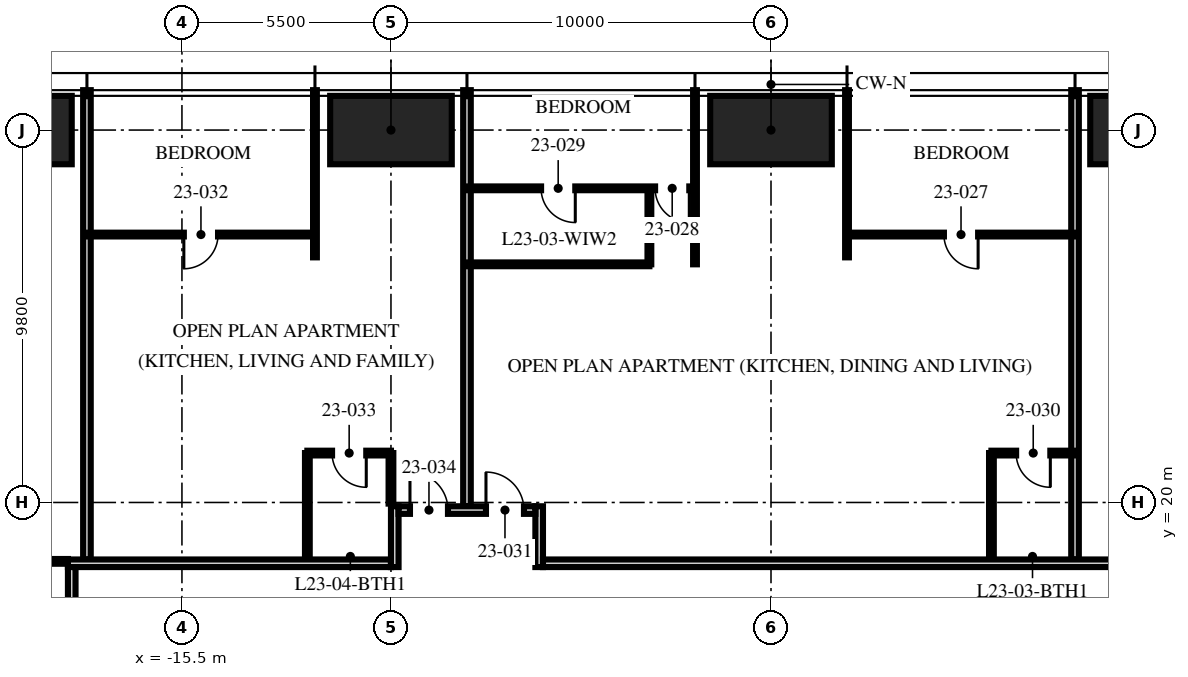
"""IFC4 building model, lengths in metres.
Left out: names, types, materials, properties, quantities, classifications, styles, units other than length and angle.
Written with IfcOpenShell. Run it as: python <this file> out.ifc"""

import sys

from ifc_helpers import new_model, si_unit, direction, frame, frame_2d, origin, origin_2d, place, context, subcontext, project, spatial, rectangle, hollow_rectangle, extrude, element, fill, save


model = new_model("IFC4")
c1 = context("Model", 3, precision=1e-05, world=origin(), true_north=direction((0.0, 1.0)))
c2 = subcontext(c1, "Body", "Model", "MODEL_VIEW")
j1 = project(units=[si_unit("LENGTHUNIT", "METRE"), si_unit("PLANEANGLEUNIT", "RADIAN")], contexts=[c1])
p1 = place(None, origin())
s1 = spatial("IfcSite", under=j1, at=p1, CompositionType="ELEMENT")
p2 = place(p1, origin())
s2 = spatial("IfcBuilding", under=s1, at=p2, CompositionType="ELEMENT")
p3 = place(p2, frame((0.0, 0.0, 92.25)))
s3 = spatial("IfcBuildingStorey", under=s2, at=p3, CompositionType="ELEMENT", Elevation=92.25)
for number, where, z_axis, x_axis in (
    (1, (-20.0, 29.8, 0.0), (0.0, 0.0, 1.0), (1.0, 0.0, 0.0)),
    (2, (-10.0, 29.8, 0.0), (0.0, 0.0, 1.0), (1.0, 0.0, 0.0)),
    (3, (0.0, 29.8, 0.0), (0.0, 0.0, 1.0), (1.0, 0.0, 0.0)),
    (4, (10.0, 29.8, 0.0), (0.0, 0.0, 1.0), (1.0, 0.0, 0.0)),
):
    element("IfcColumn", number, at=place(p3, frame(where, z_axis=z_axis, x_axis=x_axis)), inside=s3, PredefinedType="COLUMN", context=c2, shape_type="SweptSolid", body=[
        extrude(hollow_rectangle(XDim=3.2, YDim=1.8, WallThickness=0.2, at=origin_2d()), origin(), (0.0, 0.0, 1.0), 3.75),
    ])
p4 = place(p3, frame((8.0, 18.5, 0.0), z_axis=(0.0, 0.0, 1.0), x_axis=(0.0, 1.0, 0.0)))
e5 = element("IfcWall", 5, at=p4, inside=s3, PredefinedType="PARTITIONING", context=c2, shape_type="SweptSolid", body=[
    extrude(rectangle(XDim=12.35, YDim=0.2, at=frame_2d((6.175, 0.0))), origin(), (0.0, 0.0, 1.0), 2.61),
])
p5 = place(p3, frame((2.0, 26.45, 0.0), z_axis=(0.0, 0.0, 1.0), x_axis=(0.0, 1.0, 0.0)))
e6 = element("IfcWall", 6, at=p5, inside=s3, PredefinedType="PARTITIONING", context=c2, shape_type="SweptSolid", body=[
    extrude(rectangle(XDim=4.4, YDim=0.1, at=frame_2d((2.2, 0.0))), origin(), (0.0, 0.0, 1.0), 2.61),
])
p6 = place(p3, frame((-2.0, 26.267, 0.0), z_axis=(0.0, 0.0, 1.0), x_axis=(0.0, 1.0, 0.0)))
e7 = element("IfcWall", 7, at=p6, inside=s3, PredefinedType="PARTITIONING", context=c2, shape_type="SweptSolid", body=[
    extrude(rectangle(XDim=4.583, YDim=0.1, at=frame_2d((2.292, 0.0))), origin(), (0.0, 0.0, 1.0), 2.61),
])
p7 = place(p3, frame((-8.0, 19.9, 0.0), z_axis=(0.0, 0.0, 1.0), x_axis=(0.0, 1.0, 0.0)))
e8 = element("IfcWall", 8, at=p7, inside=s3, PredefinedType="PARTITIONING", context=c2, shape_type="SweptSolid", body=[
    extrude(rectangle(XDim=10.95, YDim=0.2, at=frame_2d((5.475, 0.0))), origin(), (0.0, 0.0, 1.0), 2.61),
])
p8 = place(p3, frame((-12.0, 26.45, 0.0), z_axis=(0.0, 0.0, 1.0), x_axis=(0.0, 1.0, 0.0)))
e9 = element("IfcWall", 9, at=p8, inside=s3, PredefinedType="PARTITIONING", context=c2, shape_type="SweptSolid", body=[
    extrude(rectangle(XDim=4.4, YDim=0.1, at=frame_2d((2.2, 0.0))), origin(), (0.0, 0.0, 1.0), 2.61),
])
p9 = place(p3, frame((-18.0, 18.5, 0.0), z_axis=(0.0, 0.0, 1.0), x_axis=(0.0, 1.0, 0.0)))
e10 = element("IfcWall", 10, at=p9, inside=s3, PredefinedType="PARTITIONING", context=c2, shape_type="SweptSolid", body=[
    extrude(rectangle(XDim=12.35, YDim=0.2, at=frame_2d((6.175, 0.0))), origin(), (0.0, 0.0, 1.0), 2.3),
])
p10 = place(p3, frame((8.0, 27.05, 0.0), z_axis=(0.0, 0.0, 1.0), x_axis=(-1.0, 0.0, 0.0)))
e11 = element("IfcWall", 11, at=p10, inside=s3, PredefinedType="PARTITIONING", context=c2, shape_type="SweptSolid", body=[
    extrude(rectangle(XDim=6.0, YDim=0.1, at=frame_2d((3.0, 0.0))), origin(), (0.0, 0.0, 1.0), 2.6),
])
p11 = place(p10, frame((2.55, 0.0, 0.0)))
e12 = element("IfcOpeningElement", 12, at=p11, cuts=e11, PredefinedType="OPENING", context=c2, shape_type="SweptSolid", body=[
    extrude(rectangle(XDim=0.9, YDim=2.1, at=frame_2d((0.45, 1.05))), frame((0.0, 0.06, 0.0), z_axis=(0.0, -1.0, 0.0), x_axis=(1.0, 0.0, 0.0)), (0.0, 0.0, 1.0), 0.12),
])
p12 = place(p3, frame((-2.0, 28.267, 0.0), z_axis=(0.0, 0.0, 1.0), x_axis=(-1.0, 0.0, 0.0)))
e13 = element("IfcWall", 13, at=p12, inside=s3, PredefinedType="PARTITIONING", context=c2, shape_type="SweptSolid", body=[
    extrude(rectangle(XDim=6.0, YDim=0.1, at=frame_2d((3.0, 0.0))), origin(), (0.0, 0.0, 1.0), 2.6),
])
p13 = place(p12, frame((0.15, 0.0, 0.0)))
e14 = element("IfcOpeningElement", 14, at=p13, cuts=e13, PredefinedType="OPENING", context=c2, shape_type="SweptSolid", body=[
    extrude(rectangle(XDim=0.9, YDim=2.1, at=frame_2d((0.45, 1.05))), frame((0.0, 0.06, 0.0), z_axis=(0.0, -1.0, 0.0), x_axis=(1.0, 0.0, 0.0)), (0.0, 0.0, 1.0), 0.12),
])
p14 = place(p12, frame((3.15, 0.0, 0.0)))
e15 = element("IfcOpeningElement", 15, at=p14, cuts=e13, PredefinedType="OPENING", context=c2, shape_type="SweptSolid", body=[
    extrude(rectangle(XDim=0.9, YDim=2.1, at=frame_2d((0.45, 1.05))), frame((0.0, 0.06, 0.0), z_axis=(0.0, -1.0, 0.0), x_axis=(1.0, 0.0, 0.0)), (0.0, 0.0, 1.0), 0.12),
])
p15 = place(p3, frame((-3.2, 26.267, 0.0), z_axis=(0.0, 0.0, 1.0), x_axis=(0.0, 1.0, 0.0)))
e16 = element("IfcWall", 16, at=p15, inside=s3, PredefinedType="PARTITIONING", context=c2, shape_type="SweptSolid", body=[
    extrude(rectangle(XDim=2.0, YDim=0.1, at=frame_2d((1.0, 0.0))), origin(), (0.0, 0.0, 1.0), 3.5),
])
p16 = place(p3, frame((-3.2, 26.267, 0.0), z_axis=(0.0, 0.0, 1.0), x_axis=(-1.0, 0.0, 0.0)))
e17 = element("IfcWall", 17, at=p16, inside=s3, PredefinedType="PARTITIONING", context=c2, shape_type="SweptSolid", body=[
    extrude(rectangle(XDim=4.8, YDim=0.1, at=frame_2d((2.4, 0.0))), origin(), (0.0, 0.0, 1.0), 2.6),
])
p17 = place(p3, frame((8.0, 21.3, 0.0), z_axis=(0.0, 0.0, 1.0), x_axis=(-1.0, 0.0, 0.0)))
e18 = element("IfcWall", 18, at=p17, inside=s3, PredefinedType="PARTITIONING", context=c2, shape_type="SweptSolid", body=[
    extrude(rectangle(XDim=2.2, YDim=0.125, at=frame_2d((1.1, 0.0))), origin(), (0.0, 0.0, 1.0), 3.5),
])
p18 = place(p17, frame((0.65, 0.0, 0.0)))
e19 = element("IfcOpeningElement", 19, at=p18, cuts=e18, PredefinedType="OPENING", context=c2, shape_type="SweptSolid", body=[
    extrude(rectangle(XDim=0.9, YDim=2.1, at=frame_2d((0.45, 1.05))), frame((0.0, 0.073, 0.0), z_axis=(0.0, -1.0, 0.0), x_axis=(1.0, 0.0, 0.0)), (0.0, 0.0, 1.0), 0.145),
])
p19 = place(p3, frame((5.8, 18.5, 0.0), z_axis=(0.0, 0.0, 1.0), x_axis=(0.0, 1.0, 0.0)))
e20 = element("IfcWall", 20, at=p19, inside=s3, PredefinedType="PARTITIONING", context=c2, shape_type="SweptSolid", body=[
    extrude(rectangle(XDim=2.8, YDim=0.125, at=frame_2d((1.4, 0.0))), origin(), (0.0, 0.0, 1.0), 3.5),
])
p20 = place(p3, frame((-12.0, 27.05, 0.0), z_axis=(0.0, 0.0, 1.0), x_axis=(-1.0, 0.0, 0.0)))
e21 = element("IfcWall", 21, at=p20, inside=s3, PredefinedType="PARTITIONING", context=c2, shape_type="SweptSolid", body=[
    extrude(rectangle(XDim=6.0, YDim=0.1, at=frame_2d((3.0, 0.0))), origin(), (0.0, 0.0, 1.0), 2.6),
])
p21 = place(p20, frame((2.55, 0.0, 0.0)))
e22 = element("IfcOpeningElement", 22, at=p21, cuts=e21, PredefinedType="OPENING", context=c2, shape_type="SweptSolid", body=[
    extrude(rectangle(XDim=0.9, YDim=2.1, at=frame_2d((0.45, 1.05))), frame((0.0, 0.06, 0.0), z_axis=(0.0, -1.0, 0.0), x_axis=(1.0, 0.0, 0.0)), (0.0, 0.0, 1.0), 0.12),
])
p22 = place(p3, frame((-10.0, 21.3, 0.0), z_axis=(0.0, 0.0, 1.0), x_axis=(-1.0, 0.0, 0.0)))
e23 = element("IfcWall", 23, at=p22, inside=s3, PredefinedType="PARTITIONING", context=c2, shape_type="SweptSolid", body=[
    extrude(rectangle(XDim=2.2, YDim=0.125, at=frame_2d((1.1, 0.0))), origin(), (0.0, 0.0, 1.0), 2.492),
])
p23 = place(p22, frame((0.65, 0.0, 0.0)))
e24 = element("IfcOpeningElement", 24, at=p23, cuts=e23, PredefinedType="OPENING", context=c2, shape_type="SweptSolid", body=[
    extrude(rectangle(XDim=0.9, YDim=2.1, at=frame_2d((0.45, 1.05))), frame((0.0, 0.073, 0.0), z_axis=(0.0, -1.0, 0.0), x_axis=(1.0, 0.0, 0.0)), (0.0, 0.0, 1.0), 0.145),
])
p24 = place(p3, frame((-10.0, 19.97, 0.0), z_axis=(0.0, 0.0, 1.0), x_axis=(0.0, 1.0, 0.0)))
e25 = element("IfcWall", 25, at=p24, inside=s3, PredefinedType="PARTITIONING", context=c2, shape_type="SweptSolid", body=[
    extrude(rectangle(XDim=1.33, YDim=0.125, at=frame_2d((0.665, 0.0))), origin(), (0.0, 0.0, 1.0), 2.492),
])
p25 = place(p3, frame((-12.2, 18.5, 0.0), z_axis=(0.0, 0.0, 1.0), x_axis=(0.0, 1.0, 0.0)))
e26 = element("IfcWall", 26, at=p25, inside=s3, PredefinedType="PARTITIONING", context=c2, shape_type="SweptSolid", body=[
    extrude(rectangle(XDim=2.8, YDim=0.125, at=frame_2d((1.4, 0.0))), origin(), (0.0, 0.0, 1.0), 3.5),
])
p26 = place(p3, frame((-18.5, 18.45, 0.0), z_axis=(0.0, 0.0, 1.0), x_axis=(-1.0, 0.0, 0.0)))
e27 = element("IfcWall", 27, at=p26, inside=s3, PredefinedType="PARTITIONING", context=c2, shape_type="SweptSolid", body=[
    extrude(rectangle(XDim=2.8, YDim=0.125, at=frame_2d((1.4, 0.0))), origin(), (0.0, 0.0, 1.0), 2.3),
])
p27 = place(p3, frame((-18.5, 18.4, 0.0), z_axis=(0.0, 0.0, 1.0), x_axis=(1.0, 0.0, 0.0)))
e28 = element("IfcWall", 28, at=p27, inside=s3, PredefinedType="PARTITIONING", context=c2, shape_type="SweptSolid", body=[
    extrude(rectangle(XDim=8.5, YDim=0.2, at=frame_2d((4.25, 0.0))), origin(), (0.0, 0.0, 1.0), 2.3),
])
p28 = place(p3, frame((-9.9, 18.3, 0.0), z_axis=(0.0, 0.0, 1.0), x_axis=(0.0, 1.0, 0.0)))
e29 = element("IfcWall", 29, at=p28, inside=s3, PredefinedType="PARTITIONING", context=c2, shape_type="SweptSolid", body=[
    extrude(rectangle(XDim=1.6, YDim=0.2, at=frame_2d((0.8, 0.0))), origin(), (0.0, 0.0, 1.0), 2.492),
])
p29 = place(p3, frame((-6.1, 18.3, 0.0), z_axis=(0.0, 0.0, 1.0), x_axis=(0.0, 1.0, 0.0)))
e30 = element("IfcWall", 30, at=p29, inside=s3, PredefinedType="PARTITIONING", context=c2, shape_type="SweptSolid", body=[
    extrude(rectangle(XDim=1.6, YDim=0.2, at=frame_2d((0.8, 0.0))), origin(), (0.0, 0.0, 1.0), 3.5),
])
p30 = place(p3, frame((-9.8, 19.8, 0.0), z_axis=(0.0, 0.0, 1.0), x_axis=(1.0, 0.0, 0.0)))
e31 = element("IfcWall", 31, at=p30, inside=s3, PredefinedType="PARTITIONING", context=c2, shape_type="SweptSolid", body=[
    extrude(rectangle(XDim=3.6, YDim=0.2, at=frame_2d((1.8, 0.0))), origin(), (0.0, 0.0, 1.0), 3.5),
])
p31 = place(p30, frame((2.3, 0.0, 0.0)))
e32 = element("IfcOpeningElement", 32, at=p31, cuts=e31, PredefinedType="OPENING", context=c2, shape_type="SweptSolid", body=[
    extrude(rectangle(XDim=1.0, YDim=2.2, at=frame_2d((0.5, 1.1))), frame((0.0, 0.11, 0.0), z_axis=(0.0, -1.0, 0.0), x_axis=(1.0, 0.0, 0.0)), (0.0, 0.0, 1.0), 0.22),
])
p32 = place(p30, frame((0.3, 0.0, 0.0)))
e33 = element("IfcOpeningElement", 33, at=p32, cuts=e31, PredefinedType="OPENING", context=c2, shape_type="SweptSolid", body=[
    extrude(rectangle(XDim=1.0, YDim=2.2, at=frame_2d((0.5, 1.1))), frame((0.0, 0.11, 0.0), z_axis=(0.0, -1.0, 0.0), x_axis=(1.0, 0.0, 0.0)), (0.0, 0.0, 1.0), 0.22),
])
p33 = place(p3, frame((-6.0, 18.4, 0.0), z_axis=(0.0, 0.0, 1.0), x_axis=(1.0, 0.0, 0.0)))
e34 = element("IfcWall", 34, at=p33, inside=s3, PredefinedType="PARTITIONING", context=c2, shape_type="SweptSolid", body=[
    extrude(rectangle(XDim=24.5, YDim=0.2, at=frame_2d((12.25, 0.0))), origin(), (0.0, 0.0, 1.0), 2.3),
])
p34 = place(p3, frame((-18.4, 18.3, 0.0), z_axis=(0.0, 0.0, 1.0), x_axis=(0.0, -1.0, 0.0)))
e35 = element("IfcWall", 35, at=p34, inside=s3, PredefinedType="PARTITIONING", context=c2, shape_type="SweptSolid", body=[
    extrude(rectangle(XDim=8.3, YDim=0.2, at=frame_2d((4.15, 0.0))), origin(), (0.0, 0.0, 1.0), 2.3),
])
p35 = place(p11, origin())
e36 = element("IfcDoor", 36, at=p35, inside=s3, OperationType="SINGLE_SWING_LEFT", PredefinedType="DOOR", context=c2, shape_type="SweptSolid", body=[
    extrude(rectangle(XDim=0.9, YDim=2.1, at=frame_2d((0.45, 1.05))), frame((0.0, 0.025, 0.0), z_axis=(0.0, -1.0, 0.0), x_axis=(1.0, 0.0, 0.0)), (0.0, 0.0, 1.0), 0.05),
])
fill(e12, e36)
p36 = place(p13, origin())
e37 = element("IfcDoor", 37, at=p36, inside=s3, OperationType="SINGLE_SWING_LEFT", PredefinedType="DOOR", context=c2, shape_type="SweptSolid", body=[
    extrude(rectangle(XDim=0.9, YDim=2.1, at=frame_2d((0.45, 1.05))), frame((0.0, 0.025, 0.0), z_axis=(0.0, -1.0, 0.0), x_axis=(1.0, 0.0, 0.0)), (0.0, 0.0, 1.0), 0.05),
])
fill(e14, e37)
p37 = place(p14, origin())
e38 = element("IfcDoor", 38, at=p37, inside=s3, OperationType="SINGLE_SWING_LEFT", PredefinedType="DOOR", context=c2, shape_type="SweptSolid", body=[
    extrude(rectangle(XDim=0.9, YDim=2.1, at=frame_2d((0.45, 1.05))), frame((0.0, 0.025, 0.0), z_axis=(0.0, -1.0, 0.0), x_axis=(1.0, 0.0, 0.0)), (0.0, 0.0, 1.0), 0.05),
])
fill(e15, e38)
p38 = place(p18, origin())
e39 = element("IfcDoor", 39, at=p38, inside=s3, OperationType="SINGLE_SWING_LEFT", PredefinedType="DOOR", context=c2, shape_type="SweptSolid", body=[
    extrude(rectangle(XDim=0.9, YDim=2.1, at=frame_2d((0.45, 1.05))), frame((0.0, 0.025, 0.0), z_axis=(0.0, -1.0, 0.0), x_axis=(1.0, 0.0, 0.0)), (0.0, 0.0, 1.0), 0.05),
])
fill(e19, e39)
p39 = place(p31, origin())
e40 = element("IfcDoor", 40, at=p39, inside=s3, OperationType="SINGLE_SWING_LEFT", PredefinedType="DOOR", context=c2, shape_type="SweptSolid", body=[
    extrude(rectangle(XDim=1.0, YDim=2.2, at=frame_2d((0.5, 1.1))), frame((0.0, 0.025, 0.0), z_axis=(0.0, -1.0, 0.0), x_axis=(1.0, 0.0, 0.0)), (0.0, 0.0, 1.0), 0.05),
])
fill(e32, e40)
p40 = place(p21, origin())
e41 = element("IfcDoor", 41, at=p40, inside=s3, OperationType="SINGLE_SWING_RIGHT", PredefinedType="DOOR", context=c2, shape_type="SweptSolid", body=[
    extrude(rectangle(XDim=0.9, YDim=2.1, at=frame_2d((0.45, 1.05))), frame((0.0, 0.025, 0.0), z_axis=(0.0, -1.0, 0.0), x_axis=(1.0, 0.0, 0.0)), (0.0, 0.0, 1.0), 0.05),
])
fill(e22, e41)
p41 = place(p23, origin())
e42 = element("IfcDoor", 42, at=p41, inside=s3, OperationType="SINGLE_SWING_LEFT", PredefinedType="DOOR", context=c2, shape_type="SweptSolid", body=[
    extrude(rectangle(XDim=0.9, YDim=2.1, at=frame_2d((0.45, 1.05))), frame((0.0, 0.025, 0.0), z_axis=(0.0, -1.0, 0.0), x_axis=(1.0, 0.0, 0.0)), (0.0, 0.0, 1.0), 0.05),
])
fill(e24, e42)
p42 = place(p32, origin())
e43 = element("IfcDoor", 43, at=p42, inside=s3, OperationType="SINGLE_SWING_LEFT", PredefinedType="DOOR", context=c2, shape_type="SweptSolid", body=[
    extrude(rectangle(XDim=1.0, YDim=2.2, at=frame_2d((0.5, 1.1))), frame((0.0, 0.025, 0.0), z_axis=(0.0, -1.0, 0.0), x_axis=(1.0, 0.0, 0.0)), (0.0, 0.0, 1.0), 0.05),
])
fill(e33, e43)
save(model, sys.argv[1])
